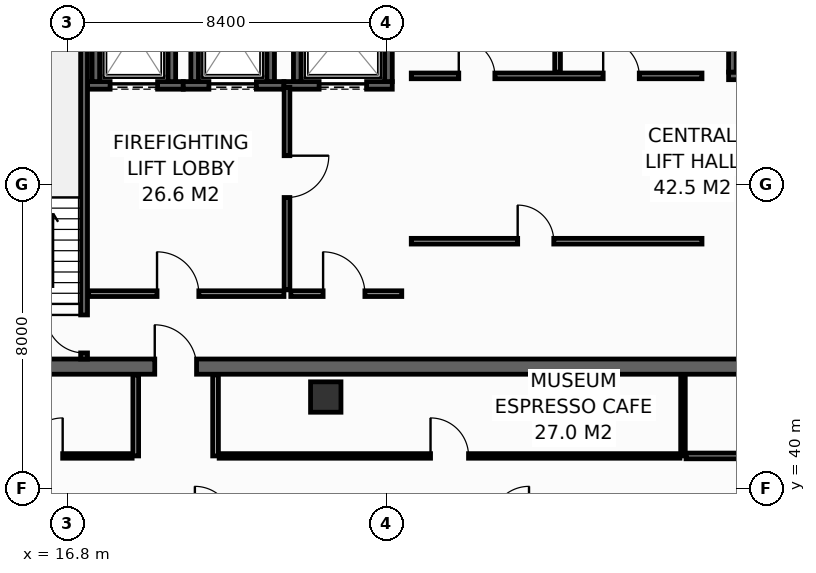
"""IFC4 building model, lengths in metres.
Left out: names, types, materials, properties, quantities, classifications, styles, units other than length and angle.
Written with IfcOpenShell. Run it as: python <this file> out.ifc"""

import sys

from ifc_helpers import new_model, si_unit, direction, frame, frame_2d, origin, origin_2d, place, context, subcontext, project, spatial, rectangle, hollow_rectangle, extrude, element, fill, save


model = new_model("IFC4")
c1 = context("Model", 3, precision=1e-05, world=origin(), true_north=direction((0.0, 1.0)))
c2 = subcontext(c1, "Body", "Model", "MODEL_VIEW")
j1 = project(units=[si_unit("LENGTHUNIT", "METRE"), si_unit("PLANEANGLEUNIT", "RADIAN")], contexts=[c1])
p1 = place(None, origin())
s1 = spatial("IfcSite", under=j1, at=p1, CompositionType="ELEMENT")
p2 = place(p1, origin())
s2 = spatial("IfcBuilding", under=s1, at=p2, CompositionType="ELEMENT")
p3 = place(p2, frame((0.0, 0.0, 257.2)))
s3 = spatial("IfcBuildingStorey", under=s2, at=p3, CompositionType="ELEMENT", Elevation=257.2)
p4 = place(p3, frame((13.7, 43.2, 0.0), z_axis=(0.0, 0.0, 1.0), x_axis=(1.0, 0.0, 0.0)))
e1 = element("IfcWall", 1, at=p4, inside=s3, PredefinedType="SHEAR", context=c2, shape_type="SweptSolid", body=[
    extrude(rectangle(XDim=32.5, YDim=0.4, at=frame_2d((16.25, 0.0))), origin(), (0.0, 0.0, 1.0), 3.55),
])
p5 = place(p4, frame((5.4, 0.0, 0.0)))
e2 = element("IfcOpeningElement", 2, at=p5, cuts=e1, PredefinedType="OPENING", context=c2, shape_type="SweptSolid", body=[
    extrude(rectangle(XDim=1.1, YDim=2.15, at=frame_2d((0.55, 1.075))), frame((0.0, 0.21, 0.0), z_axis=(0.0, -1.0, 0.0), x_axis=(1.0, 0.0, 0.0)), (0.0, 0.0, 1.0), 0.42),
])
p6 = place(p4, frame((25.6, 0.0, 0.0)))
e3 = element("IfcOpeningElement", 3, at=p6, cuts=e1, PredefinedType="OPENING", context=c2, shape_type="SweptSolid", body=[
    extrude(rectangle(XDim=1.1, YDim=2.15, at=frame_2d((0.55, 1.075))), frame((0.0, 0.21, 0.0), z_axis=(0.0, -1.0, 0.0), x_axis=(1.0, 0.0, 0.0)), (0.0, 0.0, 1.0), 0.42),
])
p7 = place(p3, frame((23.6, 42.4, 0.0), z_axis=(0.0, 0.0, 1.0), x_axis=(1.0, 0.0, 0.0)))
e4 = element("IfcColumn", 4, at=p7, inside=s3, PredefinedType="COLUMN", context=c2, shape_type="SweptSolid", body=[
    extrude(hollow_rectangle(XDim=0.8, YDim=0.8, WallThickness=0.036, at=origin_2d()), origin(), (0.0, 0.0, 1.0), 3.8),
])
p8 = place(p3, frame((17.33, 50.6, 0.0), z_axis=(0.0, 0.0, 1.0), x_axis=(1.0, 0.0, 0.0)))
e5 = element("IfcWall", 5, at=p8, inside=s3, PredefinedType="SHEAR", context=c2, shape_type="SweptSolid", body=[
    extrude(rectangle(XDim=2.52, YDim=0.2, at=frame_2d((1.26, 0.0))), origin(), (0.0, 0.0, 1.0), 3.55),
])
p9 = place(p8, frame((0.595, 0.0, 0.0)))
e6 = element("IfcOpeningElement", 6, at=p9, cuts=e5, PredefinedType="OPENING", context=c2, shape_type="SweptSolid", body=[
    extrude(rectangle(XDim=1.25, YDim=2.3, at=frame_2d((0.625, 1.15))), frame((0.0, 0.11, 0.0), z_axis=(0.0, -1.0, 0.0), x_axis=(1.0, 0.0, 0.0)), (0.0, 0.0, 1.0), 0.22),
])
for number, where, z_axis, x_axis in (
    (7, (17.55, 50.7, 0.0), (0.0, 0.0, 1.0), (0.0, 1.0, 0.0)),
    (8, (19.55, 50.7, 0.0), (0.0, 0.0, 1.0), (0.0, 1.0, 0.0)),
):
    element("IfcWall", number, at=place(p3, frame(where, z_axis=z_axis, x_axis=x_axis)), inside=s3, PredefinedType="SHEAR", context=c2, shape_type="SweptSolid", body=[
        extrude(rectangle(XDim=2.6, YDim=0.2, at=frame_2d((1.3, 0.0))), origin(), (0.0, 0.0, 1.0), 3.55),
    ])
p10 = place(p3, frame((19.85, 50.6, 0.0), z_axis=(0.0, 0.0, 1.0), x_axis=(1.0, 0.0, 0.0)))
e9 = element("IfcWall", 9, at=p10, inside=s3, PredefinedType="SHEAR", context=c2, shape_type="SweptSolid", body=[
    extrude(rectangle(XDim=2.65, YDim=0.2, at=frame_2d((1.325, 0.0))), origin(), (0.0, 0.0, 1.0), 3.55),
])
p11 = place(p10, frame((0.675, 0.0, 0.0)))
e10 = element("IfcOpeningElement", 10, at=p11, cuts=e9, PredefinedType="OPENING", context=c2, shape_type="SweptSolid", body=[
    extrude(rectangle(XDim=1.25, YDim=2.3, at=frame_2d((0.625, 1.15))), frame((0.0, 0.11, 0.0), z_axis=(0.0, -1.0, 0.0), x_axis=(1.0, 0.0, 0.0)), (0.0, 0.0, 1.0), 0.22),
])
for number, where, z_axis, x_axis in (
    (11, (20.15, 50.7, 0.0), (0.0, 0.0, 1.0), (0.0, 1.0, 0.0)),
    (12, (22.15, 50.7, 0.0), (0.0, 0.0, 1.0), (0.0, 1.0, 0.0)),
):
    element("IfcWall", number, at=place(p3, frame(where, z_axis=z_axis, x_axis=x_axis)), inside=s3, PredefinedType="SHEAR", context=c2, shape_type="SweptSolid", body=[
        extrude(rectangle(XDim=2.6, YDim=0.2, at=frame_2d((1.3, 0.0))), origin(), (0.0, 0.0, 1.0), 3.55),
    ])
p12 = place(p3, frame((22.5, 50.6, 0.0), z_axis=(0.0, 0.0, 1.0), x_axis=(1.0, 0.0, 0.0)))
e13 = element("IfcWall", 13, at=p12, inside=s3, PredefinedType="SHEAR", context=c2, shape_type="SweptSolid", body=[
    extrude(rectangle(XDim=2.85, YDim=0.2, at=frame_2d((1.425, 0.0))), origin(), (0.0, 0.0, 1.0), 3.55),
])
p13 = place(p12, frame((0.925, 0.0, 0.0)))
e14 = element("IfcOpeningElement", 14, at=p13, cuts=e13, PredefinedType="OPENING", context=c2, shape_type="SweptSolid", body=[
    extrude(rectangle(XDim=1.25, YDim=2.3, at=frame_2d((0.625, 1.15))), frame((0.0, 0.11, 0.0), z_axis=(0.0, -1.0, 0.0), x_axis=(1.0, 0.0, 0.0)), (0.0, 0.0, 1.0), 0.22),
])
for number, where, z_axis, x_axis in (
    (15, (22.85, 50.7, 0.0), (0.0, 0.0, 1.0), (0.0, 1.0, 0.0)),
    (16, (25.25, 50.7, 0.0), (0.0, 0.0, 1.0), (0.0, 1.0, 0.0)),
):
    element("IfcWall", number, at=place(p3, frame(where, z_axis=z_axis, x_axis=x_axis)), inside=s3, PredefinedType="SHEAR", context=c2, shape_type="SweptSolid", body=[
        extrude(rectangle(XDim=2.6, YDim=0.2, at=frame_2d((1.3, 0.0))), origin(), (0.0, 0.0, 1.0), 3.55),
    ])
p14 = place(p3, frame((34.2, 50.85, 0.0), z_axis=(0.0, 0.0, 1.0), x_axis=(1.0, 0.0, 0.0)))
e17 = element("IfcWall", 17, at=p14, inside=s3, PredefinedType="SHEAR", context=c2, shape_type="SweptSolid", body=[
    extrude(rectangle(XDim=2.575, YDim=0.2, at=frame_2d((1.288, 0.0))), origin(), (0.0, 0.0, 1.0), 3.55),
])
p15 = place(p14, frame((0.65, 0.0, 0.0)))
e18 = element("IfcOpeningElement", 18, at=p15, cuts=e17, PredefinedType="OPENING", context=c2, shape_type="SweptSolid", body=[
    extrude(rectangle(XDim=1.1, YDim=2.2, at=frame_2d((0.55, 1.1))), frame((0.0, 0.11, 0.0), z_axis=(0.0, -1.0, 0.0), x_axis=(1.0, 0.0, 0.0)), (0.0, 0.0, 1.0), 0.22),
])
p16 = place(p3, frame((34.3, 50.95, 0.0), z_axis=(0.0, 0.0, 1.0), x_axis=(0.0, 1.0, 0.0)))
e19 = element("IfcWall", 19, at=p16, inside=s3, PredefinedType="SHEAR", context=c2, shape_type="SweptSolid", body=[
    extrude(rectangle(XDim=2.3, YDim=0.2, at=frame_2d((1.15, 0.0))), origin(), (0.0, 0.0, 1.0), 3.55),
])
p17 = place(p3, frame((17.24, 43.4, 0.0), z_axis=(0.0, 0.0, 1.0), x_axis=(0.0, 1.0, 0.0)))
e20 = element("IfcWall", 20, at=p17, inside=s3, PredefinedType="SHEAR", context=c2, shape_type="SweptSolid", body=[
    extrude(rectangle(XDim=10.4, YDim=0.18, at=frame_2d((5.2, 0.0))), origin(), (0.0, 0.0, 1.0), 3.55),
])
p18 = place(p17, frame((0.16, 0.0, 0.0)))
e21 = element("IfcOpeningElement", 21, at=p18, cuts=e20, PredefinedType="OPENING", context=c2, shape_type="SweptSolid", body=[
    extrude(rectangle(XDim=1.0, YDim=2.15, at=frame_2d((0.5, 1.075))), frame((0.0, 0.1, 0.0), z_axis=(0.0, -1.0, 0.0), x_axis=(1.0, 0.0, 0.0)), (0.0, 0.0, 1.0), 0.2),
])
p19 = place(p3, frame((17.36, 45.12, 0.0), z_axis=(0.0, 0.0, 1.0), x_axis=(1.0, 0.0, 0.0)))
e22 = element("IfcWall", 22, at=p19, inside=s3, PredefinedType="PARTITIONING", context=c2, shape_type="SweptSolid", body=[
    extrude(rectangle(XDim=5.14, YDim=0.15, at=frame_2d((2.57, 0.0))), origin(), (0.0, 0.0, 1.0), 3.55),
])
p20 = place(p19, frame((1.8, 0.0, 0.0)))
e23 = element("IfcOpeningElement", 23, at=p20, cuts=e22, PredefinedType="OPENING", context=c2, shape_type="SweptSolid", body=[
    extrude(rectangle(XDim=1.1, YDim=2.15, at=frame_2d((0.55, 1.075))), frame((0.0, 0.085, 0.0), z_axis=(0.0, -1.0, 0.0), x_axis=(1.0, 0.0, 0.0)), (0.0, 0.0, 1.0), 0.17),
])
p21 = place(p3, frame((22.58, 50.55, 0.0), z_axis=(0.0, 0.0, 1.0), x_axis=(0.0, -1.0, 0.0)))
e24 = element("IfcWall", 24, at=p21, inside=s3, PredefinedType="PARTITIONING", context=c2, shape_type="SweptSolid", body=[
    extrude(rectangle(XDim=5.33, YDim=0.15, at=frame_2d((2.665, 0.0))), origin(), (0.0, 0.0, 1.0), 3.55),
])
p22 = place(p21, frame((1.8, 0.0, 0.0)))
e25 = element("IfcOpeningElement", 25, at=p22, cuts=e24, PredefinedType="OPENING", context=c2, shape_type="SweptSolid", body=[
    extrude(rectangle(XDim=1.1, YDim=2.15, at=frame_2d((0.55, 1.075))), frame((0.0, 0.085, 0.0), z_axis=(0.0, -1.0, 0.0), x_axis=(1.0, 0.0, 0.0)), (0.0, 0.0, 1.0), 0.17),
])
p23 = place(p3, frame((22.68, 45.12, 0.0), z_axis=(0.0, 0.0, 1.0), x_axis=(1.0, 0.0, 0.0)))
e26 = element("IfcWall", 26, at=p23, inside=s3, PredefinedType="PARTITIONING", context=c2, shape_type="SweptSolid", body=[
    extrude(rectangle(XDim=2.92, YDim=0.15, at=frame_2d((1.46, 0.0))), origin(), (0.0, 0.0, 1.0), 3.55),
])
p24 = place(p23, frame((0.85, 0.0, 0.0)))
e27 = element("IfcOpeningElement", 27, at=p24, cuts=e26, PredefinedType="OPENING", context=c2, shape_type="SweptSolid", body=[
    extrude(rectangle(XDim=1.1, YDim=2.15, at=frame_2d((0.55, 1.075))), frame((0.0, 0.085, 0.0), z_axis=(0.0, -1.0, 0.0), x_axis=(1.0, 0.0, 0.0)), (0.0, 0.0, 1.0), 0.17),
])
p25 = place(p3, frame((25.85, 50.85, 0.0), z_axis=(0.0, 0.0, 1.0), x_axis=(1.0, 0.0, 0.0)))
e28 = element("IfcWall", 28, at=p25, inside=s3, PredefinedType="PARTITIONING", context=c2, shape_type="SweptSolid", body=[
    extrude(rectangle(XDim=7.65, YDim=0.15, at=frame_2d((3.825, 0.0))), origin(), (0.0, 0.0, 1.0), 3.55),
])
p26 = place(p25, frame((1.25, 0.0, 0.0)))
e29 = element("IfcOpeningElement", 29, at=p26, cuts=e28, PredefinedType="OPENING", context=c2, shape_type="SweptSolid", body=[
    extrude(rectangle(XDim=0.95, YDim=2.15, at=frame_2d((0.475, 1.075))), frame((0.0, 0.085, 0.0), z_axis=(0.0, -1.0, 0.0), x_axis=(1.0, 0.0, 0.0)), (0.0, 0.0, 1.0), 0.17),
])
p27 = place(p25, frame((5.05, 0.0, 0.0)))
e30 = element("IfcOpeningElement", 30, at=p27, cuts=e28, PredefinedType="OPENING", context=c2, shape_type="SweptSolid", body=[
    extrude(rectangle(XDim=0.95, YDim=2.15, at=frame_2d((0.475, 1.075))), frame((0.0, 0.085, 0.0), z_axis=(0.0, -1.0, 0.0), x_axis=(1.0, 0.0, 0.0)), (0.0, 0.0, 1.0), 0.17),
])
p28 = place(p3, frame((29.7, 50.95, 0.0), z_axis=(0.0, 0.0, 1.0), x_axis=(0.0, 1.0, 0.0)))
e31 = element("IfcWall", 31, at=p28, inside=s3, PredefinedType="PARTITIONING", context=c2, shape_type="SweptSolid", body=[
    extrude(rectangle(XDim=2.7, YDim=0.15, at=frame_2d((1.35, 0.0))), origin(), (0.0, 0.0, 1.0), 3.55),
])
p29 = place(p3, frame((25.85, 46.5, 0.0), z_axis=(0.0, 0.0, 1.0), x_axis=(1.0, 0.0, 0.0)))
e32 = element("IfcWall", 32, at=p29, inside=s3, PredefinedType="PARTITIONING", context=c2, shape_type="SweptSolid", body=[
    extrude(rectangle(XDim=7.65, YDim=0.15, at=frame_2d((3.825, 0.0))), origin(), (0.0, 0.0, 1.0), 3.55),
])
p30 = place(p29, frame((2.8, 0.0, 0.0)))
e33 = element("IfcOpeningElement", 33, at=p30, cuts=e32, PredefinedType="OPENING", context=c2, shape_type="SweptSolid", body=[
    extrude(rectangle(XDim=0.95, YDim=2.15, at=frame_2d((0.475, 1.075))), frame((0.0, 0.085, 0.0), z_axis=(0.0, -1.0, 0.0), x_axis=(1.0, 0.0, 0.0)), (0.0, 0.0, 1.0), 0.17),
])
for number, where, z_axis, x_axis in (
    (34, (18.6, 40.85, 0.0), (0.0, 0.0, 1.0), (0.0, 1.0, 0.0)),
    (35, (20.7, 40.85, 0.0), (0.0, 0.0, 1.0), (0.0, 1.0, 0.0)),
):
    element("IfcWall", number, at=place(p3, frame(where, z_axis=z_axis, x_axis=x_axis)), inside=s3, PredefinedType="PARTITIONING", context=c2, shape_type="SweptSolid", body=[
        extrude(rectangle(XDim=2.13, YDim=0.15, at=frame_2d((1.065, 0.0))), origin(), (0.0, 0.0, 1.0), 3.55),
    ])
p31 = place(p3, frame((13.85, 40.85, 0.0), z_axis=(0.0, 0.0, 1.0), x_axis=(1.0, 0.0, 0.0)))
e36 = element("IfcWall", 36, at=p31, inside=s3, PredefinedType="PARTITIONING", context=c2, shape_type="SweptSolid", body=[
    extrude(rectangle(XDim=4.655, YDim=0.12, at=frame_2d((2.327, 0.0))), origin(), (0.0, 0.0, 1.0), 3.55),
])
p32 = place(p31, frame((1.827, 0.0, 0.0)))
e37 = element("IfcOpeningElement", 37, at=p32, cuts=e36, PredefinedType="OPENING", context=c2, shape_type="SweptSolid", body=[
    extrude(rectangle(XDim=1.0, YDim=2.15, at=frame_2d((0.5, 1.075))), frame((0.0, 0.07, 0.0), z_axis=(0.0, -1.0, 0.0), x_axis=(1.0, 0.0, 0.0)), (0.0, 0.0, 1.0), 0.14),
])
p33 = place(p3, frame((33.0, 40.85, 0.0), z_axis=(0.0, 0.0, 1.0), x_axis=(0.0, 1.0, 0.0)))
e38 = element("IfcWall", 38, at=p33, inside=s3, PredefinedType="PARTITIONING", context=c2, shape_type="SweptSolid", body=[
    extrude(rectangle(XDim=2.13, YDim=0.12, at=frame_2d((1.065, 0.0))), origin(), (0.0, 0.0, 1.0), 2.947),
])
p34 = place(p3, frame((20.795, 40.85, 0.0), z_axis=(0.0, 0.0, 1.0), x_axis=(1.0, 0.0, 0.0)))
e39 = element("IfcWall", 39, at=p34, inside=s3, PredefinedType="PARTITIONING", context=c2, shape_type="SweptSolid", body=[
    extrude(rectangle(XDim=12.125, YDim=0.12, at=frame_2d((6.062, 0.0))), origin(), (0.0, 0.0, 1.0), 2.947),
])
p35 = place(p34, frame((5.562, 0.0, 0.0)))
e40 = element("IfcOpeningElement", 40, at=p35, cuts=e39, PredefinedType="OPENING", context=c2, shape_type="SweptSolid", body=[
    extrude(rectangle(XDim=1.0, YDim=2.15, at=frame_2d((0.5, 1.075))), frame((0.0, 0.07, 0.0), z_axis=(0.0, -1.0, 0.0), x_axis=(1.0, 0.0, 0.0)), (0.0, 0.0, 1.0), 0.14),
])
p36 = place(p3, frame((33.08, 40.85, 0.0), z_axis=(0.0, 0.0, 1.0), x_axis=(1.0, 0.0, 0.0)))
e41 = element("IfcWall", 41, at=p36, inside=s3, PredefinedType="PARTITIONING", context=c2, shape_type="SweptSolid", body=[
    extrude(rectangle(XDim=5.625, YDim=0.15, at=frame_2d((2.812, 0.0))), origin(), (0.0, 0.0, 1.0), 2.947),
])
p37 = place(p36, frame((1.652, 0.0, 0.0)))
e42 = element("IfcOpeningElement", 42, at=p37, cuts=e41, PredefinedType="OPENING", context=c2, shape_type="SweptSolid", body=[
    extrude(rectangle(XDim=1.0, YDim=2.15, at=frame_2d((0.5, 1.075))), frame((0.0, 0.085, 0.0), z_axis=(0.0, -1.0, 0.0), x_axis=(1.0, 0.0, 0.0)), (0.0, 0.0, 1.0), 0.17),
])
p38 = place(p9, origin())
e43 = element("IfcDoor", 43, at=p38, inside=s3, OperationType="SLIDING_TO_LEFT", PredefinedType="DOOR", context=c2, shape_type="SweptSolid", body=[
    extrude(rectangle(XDim=1.25, YDim=2.3, at=frame_2d((0.625, 1.15))), frame((0.0, 0.025, 0.0), z_axis=(0.0, -1.0, 0.0), x_axis=(1.0, 0.0, 0.0)), (0.0, 0.0, 1.0), 0.05),
])
fill(e6, e43)
p39 = place(p11, origin())
e44 = element("IfcDoor", 44, at=p39, inside=s3, OperationType="SLIDING_TO_LEFT", PredefinedType="DOOR", context=c2, shape_type="SweptSolid", body=[
    extrude(rectangle(XDim=1.25, YDim=2.3, at=frame_2d((0.625, 1.15))), frame((0.0, 0.025, 0.0), z_axis=(0.0, -1.0, 0.0), x_axis=(1.0, 0.0, 0.0)), (0.0, 0.0, 1.0), 0.05),
])
fill(e10, e44)
p40 = place(p13, origin())
e45 = element("IfcDoor", 45, at=p40, inside=s3, OperationType="SLIDING_TO_LEFT", PredefinedType="DOOR", context=c2, shape_type="SweptSolid", body=[
    extrude(rectangle(XDim=1.25, YDim=2.3, at=frame_2d((0.625, 1.15))), frame((0.0, 0.025, 0.0), z_axis=(0.0, -1.0, 0.0), x_axis=(1.0, 0.0, 0.0)), (0.0, 0.0, 1.0), 0.05),
])
fill(e14, e45)
p41 = place(p18, origin())
e46 = element("IfcDoor", 46, at=p41, inside=s3, OperationType="SINGLE_SWING_RIGHT", PredefinedType="DOOR", context=c2, shape_type="SweptSolid", body=[
    extrude(rectangle(XDim=1.0, YDim=2.15, at=frame_2d((0.5, 1.075))), frame((0.0, 0.025, 0.0), z_axis=(0.0, -1.0, 0.0), x_axis=(1.0, 0.0, 0.0)), (0.0, 0.0, 1.0), 0.05),
])
fill(e21, e46)
p42 = place(p20, origin())
e47 = element("IfcDoor", 47, at=p42, inside=s3, OperationType="SINGLE_SWING_LEFT", PredefinedType="DOOR", context=c2, shape_type="SweptSolid", body=[
    extrude(rectangle(XDim=1.1, YDim=2.15, at=frame_2d((0.55, 1.075))), frame((0.0, 0.025, 0.0), z_axis=(0.0, -1.0, 0.0), x_axis=(1.0, 0.0, 0.0)), (0.0, 0.0, 1.0), 0.05),
])
fill(e23, e47)
p43 = place(p22, origin())
e48 = element("IfcDoor", 48, at=p43, inside=s3, OperationType="SINGLE_SWING_LEFT", PredefinedType="DOOR", context=c2, shape_type="SweptSolid", body=[
    extrude(rectangle(XDim=1.1, YDim=2.15, at=frame_2d((0.55, 1.075))), frame((0.0, 0.025, 0.0), z_axis=(0.0, -1.0, 0.0), x_axis=(1.0, 0.0, 0.0)), (0.0, 0.0, 1.0), 0.05),
])
fill(e25, e48)
p44 = place(p24, origin())
e49 = element("IfcDoor", 49, at=p44, inside=s3, OperationType="SINGLE_SWING_LEFT", PredefinedType="DOOR", context=c2, shape_type="SweptSolid", body=[
    extrude(rectangle(XDim=1.1, YDim=2.15, at=frame_2d((0.55, 1.075))), frame((0.0, 0.025, 0.0), z_axis=(0.0, -1.0, 0.0), x_axis=(1.0, 0.0, 0.0)), (0.0, 0.0, 1.0), 0.05),
])
fill(e27, e49)
p45 = place(p5, origin())
e50 = element("IfcDoor", 50, at=p45, inside=s3, OperationType="SINGLE_SWING_LEFT", PredefinedType="DOOR", context=c2, shape_type="SweptSolid", body=[
    extrude(rectangle(XDim=1.1, YDim=2.15, at=frame_2d((0.55, 1.075))), frame((0.0, 0.025, 0.0), z_axis=(0.0, -1.0, 0.0), x_axis=(1.0, 0.0, 0.0)), (0.0, 0.0, 1.0), 0.05),
])
fill(e2, e50)
p46 = place(p26, origin())
e51 = element("IfcDoor", 51, at=p46, inside=s3, OperationType="SINGLE_SWING_LEFT", PredefinedType="DOOR", context=c2, shape_type="SweptSolid", body=[
    extrude(rectangle(XDim=0.95, YDim=2.15, at=frame_2d((0.475, 1.075))), frame((0.0, 0.025, 0.0), z_axis=(0.0, -1.0, 0.0), x_axis=(1.0, 0.0, 0.0)), (0.0, 0.0, 1.0), 0.05),
])
fill(e29, e51)
p47 = place(p27, origin())
e52 = element("IfcDoor", 52, at=p47, inside=s3, OperationType="SINGLE_SWING_LEFT", PredefinedType="DOOR", context=c2, shape_type="SweptSolid", body=[
    extrude(rectangle(XDim=0.95, YDim=2.15, at=frame_2d((0.475, 1.075))), frame((0.0, 0.025, 0.0), z_axis=(0.0, -1.0, 0.0), x_axis=(1.0, 0.0, 0.0)), (0.0, 0.0, 1.0), 0.05),
])
fill(e30, e52)
p48 = place(p30, origin())
e53 = element("IfcDoor", 53, at=p48, inside=s3, OperationType="SINGLE_SWING_LEFT", PredefinedType="DOOR", context=c2, shape_type="SweptSolid", body=[
    extrude(rectangle(XDim=0.95, YDim=2.15, at=frame_2d((0.475, 1.075))), frame((0.0, 0.025, 0.0), z_axis=(0.0, -1.0, 0.0), x_axis=(1.0, 0.0, 0.0)), (0.0, 0.0, 1.0), 0.05),
])
fill(e33, e53)
p49 = place(p32, origin())
e54 = element("IfcDoor", 54, at=p49, inside=s3, OperationType="SINGLE_SWING_RIGHT", PredefinedType="DOOR", context=c2, shape_type="SweptSolid", body=[
    extrude(rectangle(XDim=1.0, YDim=2.15, at=frame_2d((0.5, 1.075))), frame((0.0, 0.025, 0.0), z_axis=(0.0, -1.0, 0.0), x_axis=(1.0, 0.0, 0.0)), (0.0, 0.0, 1.0), 0.05),
])
fill(e37, e54)
p50 = place(p35, origin())
e55 = element("IfcDoor", 55, at=p50, inside=s3, OperationType="SINGLE_SWING_LEFT", PredefinedType="DOOR", context=c2, shape_type="SweptSolid", body=[
    extrude(rectangle(XDim=1.0, YDim=2.15, at=frame_2d((0.5, 1.075))), frame((0.0, 0.025, 0.0), z_axis=(0.0, -1.0, 0.0), x_axis=(1.0, 0.0, 0.0)), (0.0, 0.0, 1.0), 0.05),
])
fill(e40, e55)
save(model, sys.argv[1])
